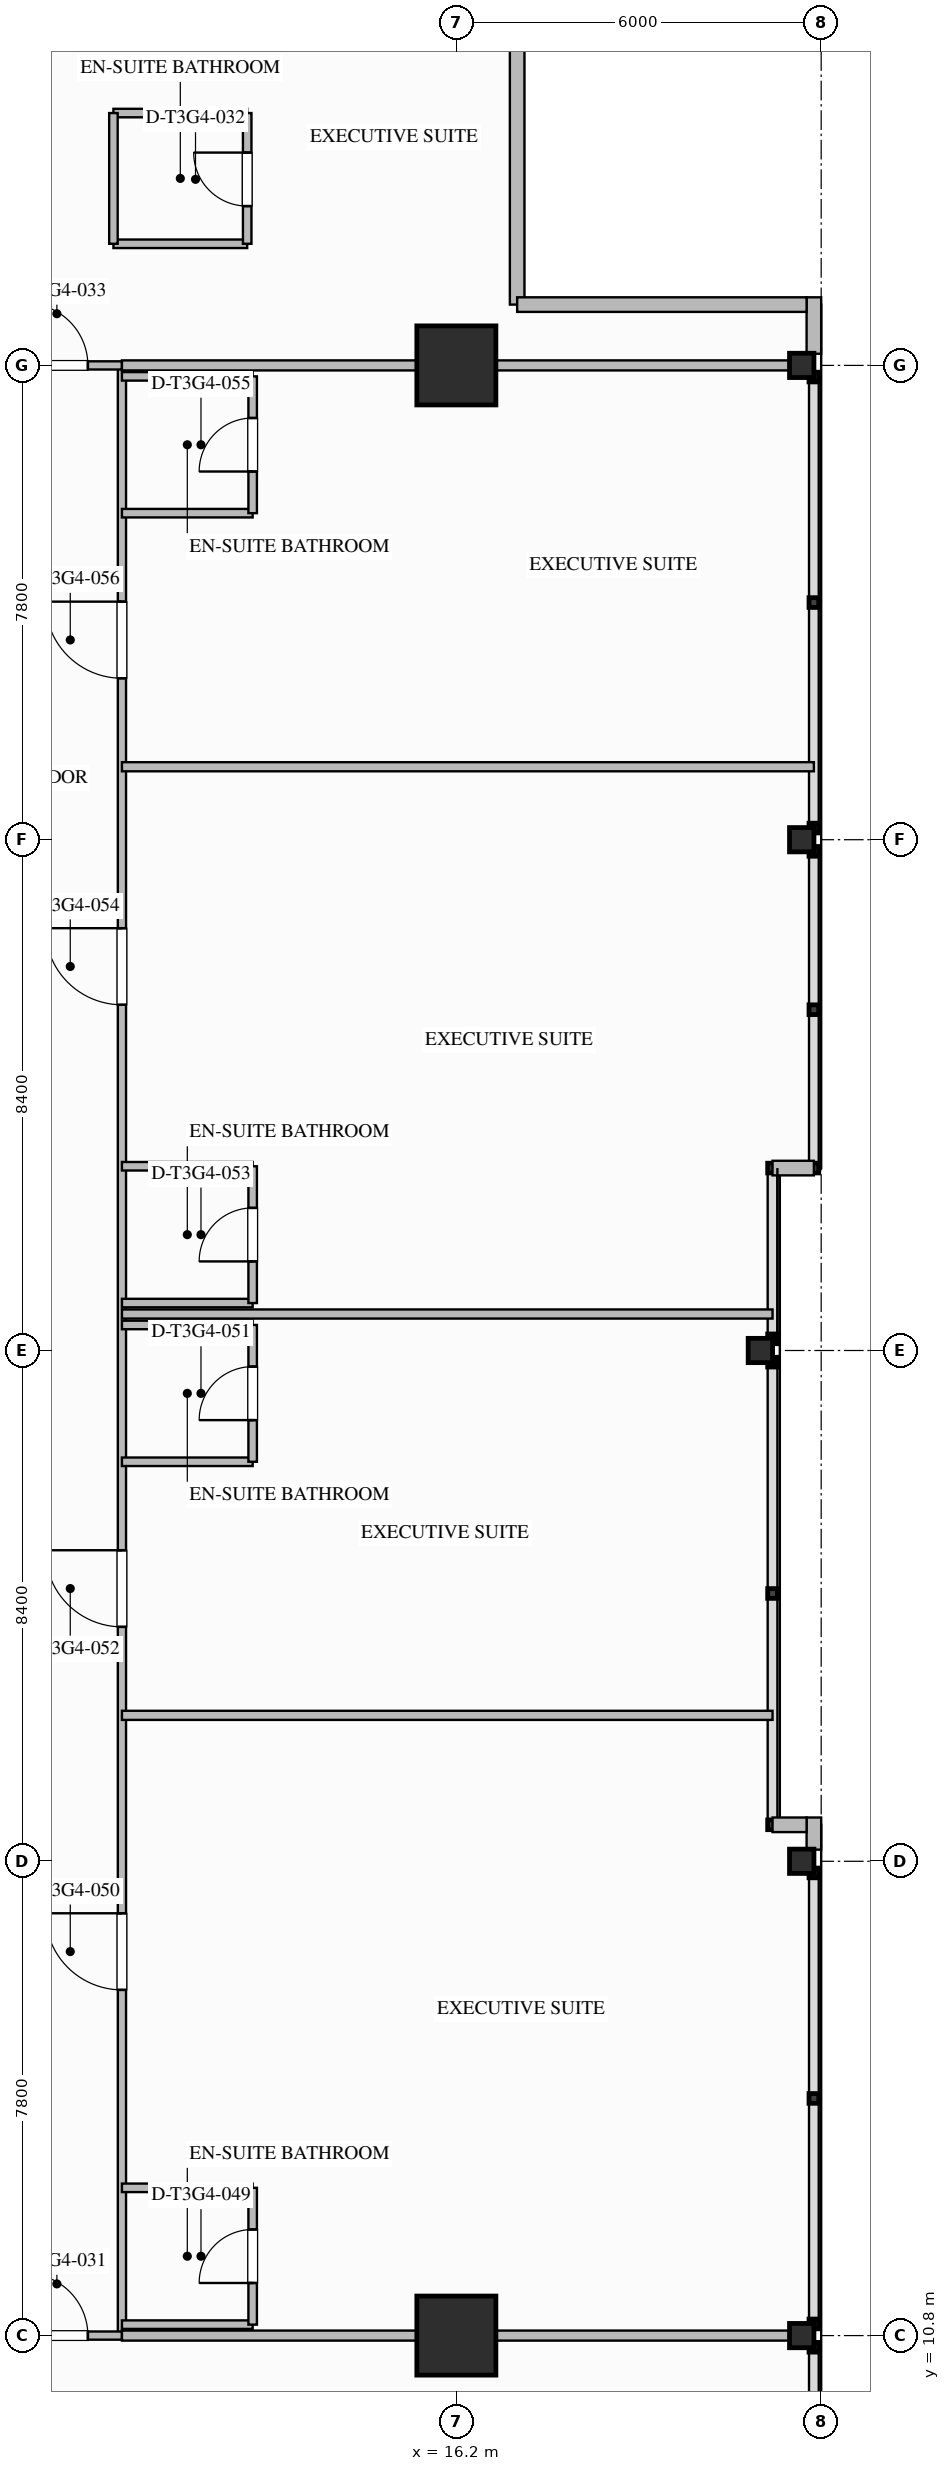
"""IFC4 building model, lengths in metres.
Left out: names, types, materials, properties, quantities, classifications, styles, units other than length and angle.
Written with IfcOpenShell. Run it as: python <this file> out.ifc"""

import sys

from ifc_helpers import new_model, si_unit, direction, frame, frame_2d, origin, origin_2d, place, context, subcontext, project, spatial, rectangle, i_section, extrude, element, fill, save


model = new_model("IFC4")
c1 = context("Model", 3, precision=1e-05, world=origin(), true_north=direction((0.0, 1.0)))
c2 = subcontext(c1, "Body", "Model", "MODEL_VIEW")
j1 = project(units=[si_unit("LENGTHUNIT", "METRE"), si_unit("PLANEANGLEUNIT", "RADIAN")], contexts=[c1])
p1 = place(None, origin())
s1 = spatial("IfcSite", under=j1, at=p1, CompositionType="ELEMENT")
p2 = place(p1, origin())
s2 = spatial("IfcBuilding", under=s1, at=p2, CompositionType="ELEMENT")
p3 = place(p2, frame((0.0, 0.0, 182.35)))
s3 = spatial("IfcBuildingStorey", under=s2, at=p3, CompositionType="ELEMENT", Elevation=182.35)
for number, where, z_axis, x_axis in (
    (1, (16.2, 10.8, 0.0), (0.0, 0.0, 1.0), (1.0, 0.0, 0.0)),
    (2, (16.2, 43.2, 0.0), (0.0, 0.0, 1.0), (1.0, 0.0, 0.0)),
):
    element("IfcColumn", number, at=place(p3, frame(where, z_axis=z_axis, x_axis=x_axis)), inside=s3, PredefinedType="COLUMN", context=c2, shape_type="SweptSolid", body=[
        extrude(rectangle(XDim=1.3, YDim=1.3, at=origin_2d()), origin(), (0.0, 0.0, 1.0), 3.55),
    ])
for number, where, z_axis, x_axis in (
    (3, (21.88, 10.8, 0.0), (0.0, 0.0, 1.0), (1.0, 0.0, 0.0)),
    (4, (21.88, 18.6, 0.0), (0.0, 0.0, 1.0), (1.0, 0.0, 0.0)),
    (5, (21.2, 27.0, 0.0), (0.0, 0.0, 1.0), (1.0, 0.0, 0.0)),
    (6, (21.88, 35.4, 0.0), (0.0, 0.0, 1.0), (1.0, 0.0, 0.0)),
    (7, (21.88, 43.2, 0.0), (0.0, 0.0, 1.0), (1.0, 0.0, 0.0)),
):
    element("IfcColumn", number, at=place(p3, frame(where, z_axis=z_axis, x_axis=x_axis)), inside=s3, PredefinedType="COLUMN", context=c2, shape_type="SweptSolid", body=[
        extrude(i_section(OverallWidth=0.401, OverallDepth=0.399, WebThickness=0.025, FlangeThickness=0.04, FilletRadius=0.025, at=origin_2d()), origin(), (0.0, 0.0, 1.0), 3.547),
    ])
p4 = place(p3, frame((22.08, 44.32, 0.0), z_axis=(0.0, 0.0, 1.0), x_axis=(0.0, -1.0, 0.0)))
e8 = element("IfcWall", 8, at=p4, inside=s3, PredefinedType="STANDARD", context=c2, shape_type="SweptSolid", body=[
    extrude(rectangle(XDim=0.928, YDim=0.24, at=frame_2d((0.464, 0.0))), origin(), (0.0, 0.0, 1.0), 3.29),
])
p5 = place(p3, frame((22.08, 19.32, 0.0), z_axis=(0.0, 0.0, 1.0), x_axis=(0.0, -1.0, 0.0)))
e9 = element("IfcWall", 9, at=p5, inside=s3, PredefinedType="STANDARD", context=c2, shape_type="SweptSolid", body=[
    extrude(rectangle(XDim=0.528, YDim=0.24, at=frame_2d((0.264, 0.0))), origin(), (0.0, 0.0, 1.0), 3.29),
])
for number, where, z_axis, x_axis in (
    (10, (17.2, 48.96, 0.0), (0.0, 0.0, 1.0), (0.0, -1.0, 0.0)),
    (11, (17.2, 44.2, 0.0), (0.0, 0.0, 1.0), (1.0, 0.0, 0.0)),
):
    element("IfcWall", number, at=place(p3, frame(where, z_axis=z_axis, x_axis=x_axis)), inside=s3, PredefinedType="STANDARD", context=c2, shape_type="SweptSolid", body=[
        extrude(rectangle(XDim=4.76, YDim=0.24, at=frame_2d((2.38, 0.0))), origin(), (0.0, 0.0, 1.0), 3.29),
    ])
p6 = place(p3, frame((22.08, 30.0, 0.0), z_axis=(0.0, 0.0, 1.0), x_axis=(-1.0, 0.0, 0.0)))
e12 = element("IfcWall", 12, at=p6, inside=s3, PredefinedType="STANDARD", context=c2, shape_type="SweptSolid", body=[
    extrude(rectangle(XDim=0.68, YDim=0.24, at=frame_2d((0.34, 0.0))), origin(), (0.0, 0.0, 1.0), 3.29),
])
p7 = place(p3, frame((21.4, 19.2, 0.0), z_axis=(0.0, 0.0, 1.0), x_axis=(1.0, 0.0, 0.0)))
e13 = element("IfcWall", 13, at=p7, inside=s3, PredefinedType="STANDARD", context=c2, shape_type="SweptSolid", body=[
    extrude(rectangle(XDim=0.56, YDim=0.24, at=frame_2d((0.28, 0.0))), origin(), (0.0, 0.0, 1.0), 3.29),
])
p8 = place(p3, frame((10.7, 10.8, 0.0), z_axis=(0.0, 0.0, 1.0), x_axis=(0.0, 1.0, 0.0)))
e14 = element("IfcWall", 14, at=p8, inside=s3, PredefinedType="PARTITIONING", context=c2, shape_type="SweptSolid", body=[
    extrude(rectangle(XDim=32.4, YDim=0.135, at=frame_2d((16.2, 0.0))), origin(), (0.0, 0.0, 1.0), 3.29),
])
p9 = place(p8, frame((5.685, 0.0, 0.0)))
e15 = element("IfcOpeningElement", 15, at=p9, cuts=e14, PredefinedType="OPENING", context=c2, shape_type="SweptSolid", body=[
    extrude(rectangle(XDim=1.26, YDim=2.2, at=frame_2d((0.63, 1.1))), frame((0.0, 0.077, 0.0), z_axis=(0.0, -1.0, 0.0), x_axis=(1.0, 0.0, 0.0)), (0.0, 0.0, 1.0), 0.155),
])
p10 = place(p8, frame((11.655, 0.0, 0.0)))
e16 = element("IfcOpeningElement", 16, at=p10, cuts=e14, PredefinedType="OPENING", context=c2, shape_type="SweptSolid", body=[
    extrude(rectangle(XDim=1.26, YDim=2.2, at=frame_2d((0.63, 1.1))), frame((0.0, 0.077, 0.0), z_axis=(0.0, -1.0, 0.0), x_axis=(1.0, 0.0, 0.0)), (0.0, 0.0, 1.0), 0.155),
])
p11 = place(p8, frame((21.885, 0.0, 0.0)))
e17 = element("IfcOpeningElement", 17, at=p11, cuts=e14, PredefinedType="OPENING", context=c2, shape_type="SweptSolid", body=[
    extrude(rectangle(XDim=1.26, YDim=2.2, at=frame_2d((0.63, 1.1))), frame((0.0, 0.077, 0.0), z_axis=(0.0, -1.0, 0.0), x_axis=(1.0, 0.0, 0.0)), (0.0, 0.0, 1.0), 0.155),
])
p12 = place(p8, frame((27.255, 0.0, 0.0)))
e18 = element("IfcOpeningElement", 18, at=p12, cuts=e14, PredefinedType="OPENING", context=c2, shape_type="SweptSolid", body=[
    extrude(rectangle(XDim=1.26, YDim=2.2, at=frame_2d((0.63, 1.1))), frame((0.0, 0.077, 0.0), z_axis=(0.0, -1.0, 0.0), x_axis=(1.0, 0.0, 0.0)), (0.0, 0.0, 1.0), 0.155),
])
p13 = place(p3, frame((8.6, 10.8, 0.0), z_axis=(0.0, 0.0, 1.0), x_axis=(1.0, 0.0, 0.0)))
e19 = element("IfcWall", 19, at=p13, inside=s3, PredefinedType="PARTITIONING", context=c2, shape_type="SweptSolid", body=[
    extrude(rectangle(XDim=2.1, YDim=0.135, at=frame_2d((1.05, 0.0))), origin(), (0.0, 0.0, 1.0), 2.579),
])
p14 = place(p13, frame((0.52, 0.0, 0.0)))
e20 = element("IfcOpeningElement", 20, at=p14, cuts=e19, PredefinedType="OPENING", context=c2, shape_type="SweptSolid", body=[
    extrude(rectangle(XDim=1.02, YDim=2.15, at=frame_2d((0.51, 1.075))), frame((0.0, 0.077, 0.0), z_axis=(0.0, -1.0, 0.0), x_axis=(1.0, 0.0, 0.0)), (0.0, 0.0, 1.0), 0.155),
])
p15 = place(p3, frame((8.6, 43.2, 0.0), z_axis=(0.0, 0.0, 1.0), x_axis=(1.0, 0.0, 0.0)))
e21 = element("IfcWall", 21, at=p15, inside=s3, PredefinedType="PARTITIONING", context=c2, shape_type="SweptSolid", body=[
    extrude(rectangle(XDim=2.1, YDim=0.135, at=frame_2d((1.05, 0.0))), origin(), (0.0, 0.0, 1.0), 2.579),
])
p16 = place(p15, frame((0.52, 0.0, 0.0)))
e22 = element("IfcOpeningElement", 22, at=p16, cuts=e21, PredefinedType="OPENING", context=c2, shape_type="SweptSolid", body=[
    extrude(rectangle(XDim=1.02, YDim=2.15, at=frame_2d((0.51, 1.075))), frame((0.0, 0.077, 0.0), z_axis=(0.0, -1.0, 0.0), x_axis=(1.0, 0.0, 0.0)), (0.0, 0.0, 1.0), 0.155),
])
for number, where, z_axis, x_axis in (
    (23, (10.7, 10.8, 0.0), (0.0, 0.0, 1.0), (1.0, 0.0, 0.0)),
    (24, (10.7, 43.2, 0.0), (0.0, 0.0, 1.0), (1.0, 0.0, 0.0)),
):
    element("IfcWall", number, at=place(p3, frame(where, z_axis=z_axis, x_axis=x_axis)), inside=s3, PredefinedType="PARTITIONING", context=c2, shape_type="SweptSolid", body=[
        extrude(rectangle(XDim=11.38, YDim=0.165, at=frame_2d((5.69, 0.0))), origin(), (0.0, 0.0, 1.0), 2.579),
    ])
for number, where, z_axis, x_axis in (
    (25, (10.56, 45.2, 0.0), (0.0, 0.0, 1.0), (1.0, 0.0, 0.0)),
    (26, (10.56, 47.35, 0.0), (0.0, 0.0, 1.0), (1.0, 0.0, 0.0)),
):
    element("IfcWall", number, at=place(p3, frame(where, z_axis=z_axis, x_axis=x_axis)), inside=s3, PredefinedType="PLUMBINGWALL", context=c2, shape_type="SweptSolid", body=[
        extrude(rectangle(XDim=2.2, YDim=0.14, at=frame_2d((1.1, 0.0))), origin(), (0.0, 0.0, 1.0), 3.29),
    ])
p17 = place(p3, frame((10.56, 45.2, 0.0), z_axis=(0.0, 0.0, 1.0), x_axis=(0.0, 1.0, 0.0)))
e27 = element("IfcWall", 27, at=p17, inside=s3, PredefinedType="PLUMBINGWALL", context=c2, shape_type="SweptSolid", body=[
    extrude(rectangle(XDim=2.15, YDim=0.14, at=frame_2d((1.075, 0.0))), origin(), (0.0, 0.0, 1.0), 3.29),
])
p18 = place(p3, frame((12.76, 45.2, 0.0), z_axis=(0.0, 0.0, 1.0), x_axis=(0.0, 1.0, 0.0)))
e28 = element("IfcWall", 28, at=p18, inside=s3, PredefinedType="PLUMBINGWALL", context=c2, shape_type="SweptSolid", body=[
    extrude(rectangle(XDim=2.15, YDim=0.14, at=frame_2d((1.075, 0.0))), origin(), (0.0, 0.0, 1.0), 3.29),
])
p19 = place(p18, frame((0.62, 0.0, 0.0)))
e29 = element("IfcOpeningElement", 29, at=p19, cuts=e28, PredefinedType="OPENING", context=c2, shape_type="SweptSolid", body=[
    extrude(rectangle(XDim=0.88, YDim=2.1, at=frame_2d((0.44, 1.05))), frame((0.0, 0.08, 0.0), z_axis=(0.0, -1.0, 0.0), x_axis=(1.0, 0.0, 0.0)), (0.0, 0.0, 1.0), 0.16),
])
p20 = place(p3, frame((10.7, 10.98, 0.0), z_axis=(0.0, 0.0, 1.0), x_axis=(1.0, 0.0, 0.0)))
e30 = element("IfcWall", 30, at=p20, inside=s3, PredefinedType="PLUMBINGWALL", context=c2, shape_type="SweptSolid", body=[
    extrude(rectangle(XDim=2.15, YDim=0.14, at=frame_2d((1.075, 0.0))), origin(), (0.0, 0.0, 1.0), 2.579),
])
p21 = place(p3, frame((10.7, 13.23, 0.0), z_axis=(0.0, 0.0, 1.0), x_axis=(1.0, 0.0, 0.0)))
e31 = element("IfcWall", 31, at=p21, inside=s3, PredefinedType="PLUMBINGWALL", context=c2, shape_type="SweptSolid", body=[
    extrude(rectangle(XDim=2.15, YDim=0.14, at=frame_2d((1.075, 0.0))), origin(), (0.0, 0.0, 1.0), 3.29),
])
p22 = place(p3, frame((12.85, 10.98, 0.0), z_axis=(0.0, 0.0, 1.0), x_axis=(0.0, 1.0, 0.0)))
e32 = element("IfcWall", 32, at=p22, inside=s3, PredefinedType="PLUMBINGWALL", context=c2, shape_type="SweptSolid", body=[
    extrude(rectangle(XDim=2.25, YDim=0.14, at=frame_2d((1.125, 0.0))), origin(), (0.0, 0.0, 1.0), 3.29),
])
p23 = place(p22, frame((0.685, 0.0, 0.0)))
e33 = element("IfcOpeningElement", 33, at=p23, cuts=e32, PredefinedType="OPENING", context=c2, shape_type="SweptSolid", body=[
    extrude(rectangle(XDim=0.88, YDim=2.1, at=frame_2d((0.44, 1.05))), frame((0.0, 0.08, 0.0), z_axis=(0.0, -1.0, 0.0), x_axis=(1.0, 0.0, 0.0)), (0.0, 0.0, 1.0), 0.16),
])
p24 = place(p3, frame((10.7, 21.0, 0.0), z_axis=(0.0, 0.0, 1.0), x_axis=(1.0, 0.0, 0.0)))
e34 = element("IfcWall", 34, at=p24, inside=s3, PredefinedType="PARTITIONING", context=c2, shape_type="SweptSolid", body=[
    extrude(rectangle(XDim=10.7, YDim=0.15, at=frame_2d((5.35, 0.0))), origin(), (0.0, 0.0, 1.0), 3.29),
])
for number, where, z_axis, x_axis in (
    (35, (10.7, 25.17, 0.0), (0.0, 0.0, 1.0), (1.0, 0.0, 0.0)),
    (36, (10.7, 27.42, 0.0), (0.0, 0.0, 1.0), (1.0, 0.0, 0.0)),
):
    element("IfcWall", number, at=place(p3, frame(where, z_axis=z_axis, x_axis=x_axis)), inside=s3, PredefinedType="PLUMBINGWALL", context=c2, shape_type="SweptSolid", body=[
        extrude(rectangle(XDim=2.15, YDim=0.14, at=frame_2d((1.075, 0.0))), origin(), (0.0, 0.0, 1.0), 3.29),
    ])
p25 = place(p3, frame((12.85, 25.17, 0.0), z_axis=(0.0, 0.0, 1.0), x_axis=(0.0, 1.0, 0.0)))
e37 = element("IfcWall", 37, at=p25, inside=s3, PredefinedType="PLUMBINGWALL", context=c2, shape_type="SweptSolid", body=[
    extrude(rectangle(XDim=2.25, YDim=0.14, at=frame_2d((1.125, 0.0))), origin(), (0.0, 0.0, 1.0), 3.29),
])
p26 = place(p25, frame((0.685, 0.0, 0.0)))
e38 = element("IfcOpeningElement", 38, at=p26, cuts=e37, PredefinedType="OPENING", context=c2, shape_type="SweptSolid", body=[
    extrude(rectangle(XDim=0.88, YDim=2.1, at=frame_2d((0.44, 1.05))), frame((0.0, 0.08, 0.0), z_axis=(0.0, -1.0, 0.0), x_axis=(1.0, 0.0, 0.0)), (0.0, 0.0, 1.0), 0.16),
])
p27 = place(p3, frame((10.7, 27.6, 0.0), z_axis=(0.0, 0.0, 1.0), x_axis=(1.0, 0.0, 0.0)))
e39 = element("IfcWall", 39, at=p27, inside=s3, PredefinedType="PARTITIONING", context=c2, shape_type="SweptSolid", body=[
    extrude(rectangle(XDim=10.7, YDim=0.15, at=frame_2d((5.35, 0.0))), origin(), (0.0, 0.0, 1.0), 3.29),
])
for number, where, z_axis, x_axis in (
    (40, (10.7, 27.78, 0.0), (0.0, 0.0, 1.0), (1.0, 0.0, 0.0)),
    (41, (10.7, 30.03, 0.0), (0.0, 0.0, 1.0), (1.0, 0.0, 0.0)),
):
    element("IfcWall", number, at=place(p3, frame(where, z_axis=z_axis, x_axis=x_axis)), inside=s3, PredefinedType="PLUMBINGWALL", context=c2, shape_type="SweptSolid", body=[
        extrude(rectangle(XDim=2.15, YDim=0.14, at=frame_2d((1.075, 0.0))), origin(), (0.0, 0.0, 1.0), 3.29),
    ])
p28 = place(p3, frame((12.85, 27.78, 0.0), z_axis=(0.0, 0.0, 1.0), x_axis=(0.0, 1.0, 0.0)))
e42 = element("IfcWall", 42, at=p28, inside=s3, PredefinedType="PLUMBINGWALL", context=c2, shape_type="SweptSolid", body=[
    extrude(rectangle(XDim=2.25, YDim=0.14, at=frame_2d((1.125, 0.0))), origin(), (0.0, 0.0, 1.0), 3.29),
])
p29 = place(p28, frame((0.685, 0.0, 0.0)))
e43 = element("IfcOpeningElement", 43, at=p29, cuts=e42, PredefinedType="OPENING", context=c2, shape_type="SweptSolid", body=[
    extrude(rectangle(XDim=0.88, YDim=2.1, at=frame_2d((0.44, 1.05))), frame((0.0, 0.08, 0.0), z_axis=(0.0, -1.0, 0.0), x_axis=(1.0, 0.0, 0.0)), (0.0, 0.0, 1.0), 0.16),
])
p30 = place(p3, frame((10.7, 36.6, 0.0), z_axis=(0.0, 0.0, 1.0), x_axis=(1.0, 0.0, 0.0)))
e44 = element("IfcWall", 44, at=p30, inside=s3, PredefinedType="PARTITIONING", context=c2, shape_type="SweptSolid", body=[
    extrude(rectangle(XDim=11.38, YDim=0.15, at=frame_2d((5.69, 0.0))), origin(), (0.0, 0.0, 1.0), 3.29),
])
p31 = place(p3, frame((10.7, 40.77, 0.0), z_axis=(0.0, 0.0, 1.0), x_axis=(1.0, 0.0, 0.0)))
e45 = element("IfcWall", 45, at=p31, inside=s3, PredefinedType="PLUMBINGWALL", context=c2, shape_type="SweptSolid", body=[
    extrude(rectangle(XDim=2.15, YDim=0.14, at=frame_2d((1.075, 0.0))), origin(), (0.0, 0.0, 1.0), 3.29),
])
p32 = place(p3, frame((10.7, 43.02, 0.0), z_axis=(0.0, 0.0, 1.0), x_axis=(1.0, 0.0, 0.0)))
e46 = element("IfcWall", 46, at=p32, inside=s3, PredefinedType="PLUMBINGWALL", context=c2, shape_type="SweptSolid", body=[
    extrude(rectangle(XDim=2.15, YDim=0.14, at=frame_2d((1.075, 0.0))), origin(), (0.0, 0.0, 1.0), 2.579),
])
p33 = place(p3, frame((12.85, 40.77, 0.0), z_axis=(0.0, 0.0, 1.0), x_axis=(0.0, 1.0, 0.0)))
e47 = element("IfcWall", 47, at=p33, inside=s3, PredefinedType="PLUMBINGWALL", context=c2, shape_type="SweptSolid", body=[
    extrude(rectangle(XDim=2.25, YDim=0.14, at=frame_2d((1.125, 0.0))), origin(), (0.0, 0.0, 1.0), 3.29),
])
p34 = place(p33, frame((0.685, 0.0, 0.0)))
e48 = element("IfcOpeningElement", 48, at=p34, cuts=e47, PredefinedType="OPENING", context=c2, shape_type="SweptSolid", body=[
    extrude(rectangle(XDim=0.88, YDim=2.1, at=frame_2d((0.44, 1.05))), frame((0.0, 0.08, 0.0), z_axis=(0.0, -1.0, 0.0), x_axis=(1.0, 0.0, 0.0)), (0.0, 0.0, 1.0), 0.16),
])
p35 = place(p14, origin())
e49 = element("IfcDoor", 49, at=p35, inside=s3, OperationType="SINGLE_SWING_LEFT", PredefinedType="DOOR", context=c2, shape_type="SweptSolid", body=[
    extrude(rectangle(XDim=1.02, YDim=2.15, at=frame_2d((0.51, 1.075))), frame((0.0, 0.025, 0.0), z_axis=(0.0, -1.0, 0.0), x_axis=(1.0, 0.0, 0.0)), (0.0, 0.0, 1.0), 0.05),
])
fill(e20, e49)
p36 = place(p19, origin())
e50 = element("IfcDoor", 50, at=p36, inside=s3, OperationType="SINGLE_SWING_RIGHT", PredefinedType="DOOR", context=c2, shape_type="SweptSolid", body=[
    extrude(rectangle(XDim=0.88, YDim=2.1, at=frame_2d((0.44, 1.05))), frame((0.0, 0.025, 0.0), z_axis=(0.0, -1.0, 0.0), x_axis=(1.0, 0.0, 0.0)), (0.0, 0.0, 1.0), 0.05),
])
fill(e29, e50)
p37 = place(p16, origin())
e51 = element("IfcDoor", 51, at=p37, inside=s3, OperationType="SINGLE_SWING_LEFT", PredefinedType="DOOR", context=c2, shape_type="SweptSolid", body=[
    extrude(rectangle(XDim=1.02, YDim=2.15, at=frame_2d((0.51, 1.075))), frame((0.0, 0.025, 0.0), z_axis=(0.0, -1.0, 0.0), x_axis=(1.0, 0.0, 0.0)), (0.0, 0.0, 1.0), 0.05),
])
fill(e22, e51)
p38 = place(p23, origin())
e52 = element("IfcDoor", 52, at=p38, inside=s3, OperationType="SINGLE_SWING_LEFT", PredefinedType="DOOR", context=c2, shape_type="SweptSolid", body=[
    extrude(rectangle(XDim=0.88, YDim=2.1, at=frame_2d((0.44, 1.05))), frame((0.0, 0.025, 0.0), z_axis=(0.0, -1.0, 0.0), x_axis=(1.0, 0.0, 0.0)), (0.0, 0.0, 1.0), 0.05),
])
fill(e33, e52)
p39 = place(p9, origin())
e53 = element("IfcDoor", 53, at=p39, inside=s3, OperationType="SINGLE_SWING_RIGHT", PredefinedType="DOOR", context=c2, shape_type="SweptSolid", body=[
    extrude(rectangle(XDim=1.26, YDim=2.2, at=frame_2d((0.63, 1.1))), frame((0.0, 0.025, 0.0), z_axis=(0.0, -1.0, 0.0), x_axis=(1.0, 0.0, 0.0)), (0.0, 0.0, 1.0), 0.05),
])
fill(e15, e53)
p40 = place(p26, origin())
e54 = element("IfcDoor", 54, at=p40, inside=s3, OperationType="SINGLE_SWING_LEFT", PredefinedType="DOOR", context=c2, shape_type="SweptSolid", body=[
    extrude(rectangle(XDim=0.88, YDim=2.1, at=frame_2d((0.44, 1.05))), frame((0.0, 0.025, 0.0), z_axis=(0.0, -1.0, 0.0), x_axis=(1.0, 0.0, 0.0)), (0.0, 0.0, 1.0), 0.05),
])
fill(e38, e54)
p41 = place(p10, origin())
e55 = element("IfcDoor", 55, at=p41, inside=s3, OperationType="SINGLE_SWING_RIGHT", PredefinedType="DOOR", context=c2, shape_type="SweptSolid", body=[
    extrude(rectangle(XDim=1.26, YDim=2.2, at=frame_2d((0.63, 1.1))), frame((0.0, 0.025, 0.0), z_axis=(0.0, -1.0, 0.0), x_axis=(1.0, 0.0, 0.0)), (0.0, 0.0, 1.0), 0.05),
])
fill(e16, e55)
p42 = place(p29, origin())
e56 = element("IfcDoor", 56, at=p42, inside=s3, OperationType="SINGLE_SWING_LEFT", PredefinedType="DOOR", context=c2, shape_type="SweptSolid", body=[
    extrude(rectangle(XDim=0.88, YDim=2.1, at=frame_2d((0.44, 1.05))), frame((0.0, 0.025, 0.0), z_axis=(0.0, -1.0, 0.0), x_axis=(1.0, 0.0, 0.0)), (0.0, 0.0, 1.0), 0.05),
])
fill(e43, e56)
p43 = place(p11, origin())
e57 = element("IfcDoor", 57, at=p43, inside=s3, OperationType="SINGLE_SWING_RIGHT", PredefinedType="DOOR", context=c2, shape_type="SweptSolid", body=[
    extrude(rectangle(XDim=1.26, YDim=2.2, at=frame_2d((0.63, 1.1))), frame((0.0, 0.025, 0.0), z_axis=(0.0, -1.0, 0.0), x_axis=(1.0, 0.0, 0.0)), (0.0, 0.0, 1.0), 0.05),
])
fill(e17, e57)
p44 = place(p34, origin())
e58 = element("IfcDoor", 58, at=p44, inside=s3, OperationType="SINGLE_SWING_LEFT", PredefinedType="DOOR", context=c2, shape_type="SweptSolid", body=[
    extrude(rectangle(XDim=0.88, YDim=2.1, at=frame_2d((0.44, 1.05))), frame((0.0, 0.025, 0.0), z_axis=(0.0, -1.0, 0.0), x_axis=(1.0, 0.0, 0.0)), (0.0, 0.0, 1.0), 0.05),
])
fill(e48, e58)
p45 = place(p12, origin())
e59 = element("IfcDoor", 59, at=p45, inside=s3, OperationType="SINGLE_SWING_RIGHT", PredefinedType="DOOR", context=c2, shape_type="SweptSolid", body=[
    extrude(rectangle(XDim=1.26, YDim=2.2, at=frame_2d((0.63, 1.1))), frame((0.0, 0.025, 0.0), z_axis=(0.0, -1.0, 0.0), x_axis=(1.0, 0.0, 0.0)), (0.0, 0.0, 1.0), 0.05),
])
fill(e18, e59)
save(model, sys.argv[1])
